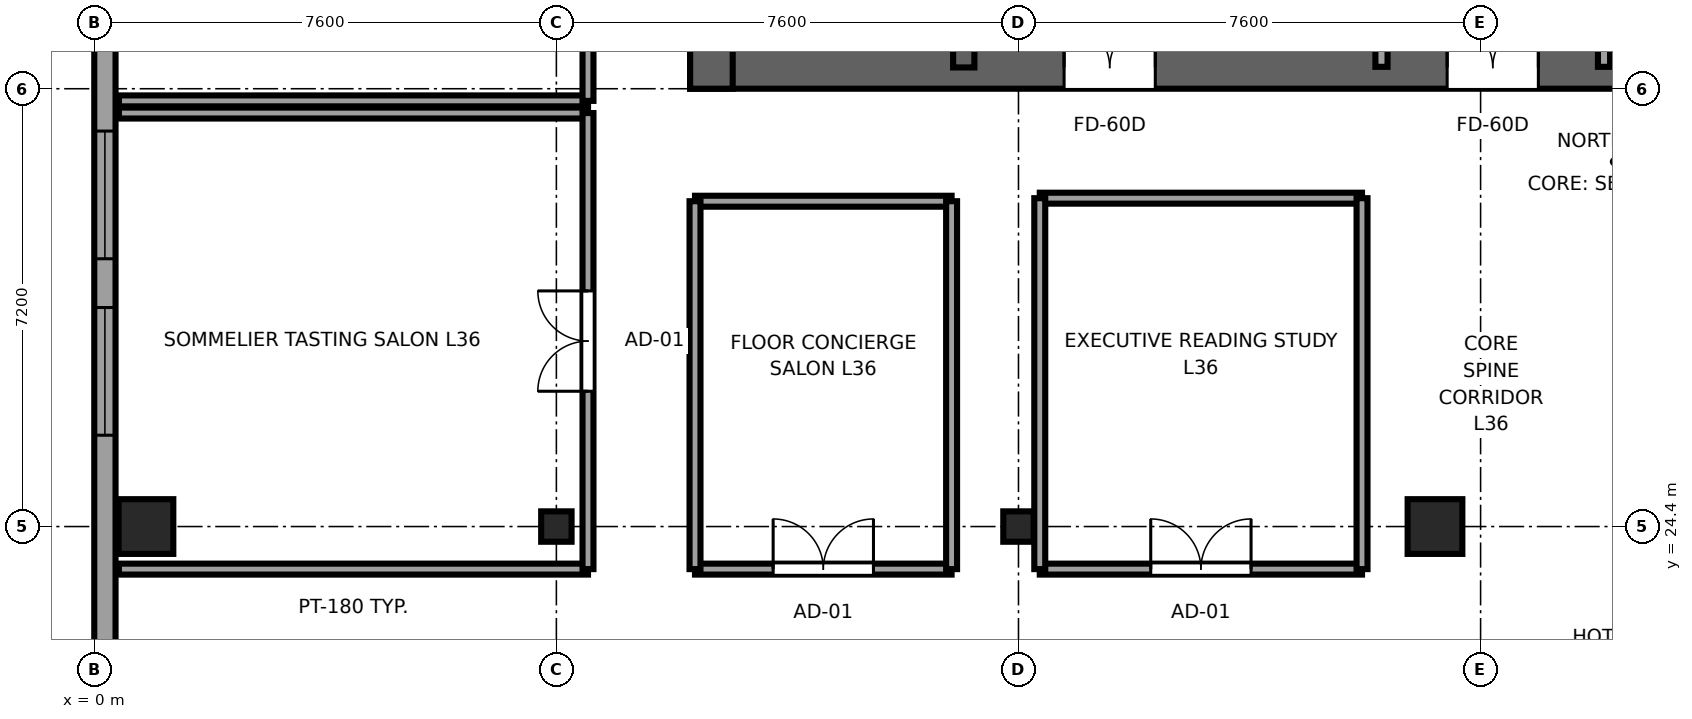
"""IFC4 building model, lengths in metres.
Left out: names, types, materials, properties, quantities, classifications, styles, units other than length and angle.
Written with IfcOpenShell. Run it as: python <this file> out.ifc"""

import sys

from ifc_helpers import new_model, si_unit, direction, frame, frame_2d, origin, origin_2d, place, context, subcontext, project, spatial, rectangle, i_section, extrude, source, transform, mapped, element, fill, save


model = new_model("IFC4")
c1 = context("Model", 3, precision=1e-05, world=origin(), true_north=direction((0.0, 1.0)))
c2 = subcontext(c1, "Body", "Model", "MODEL_VIEW")
j1 = project(units=[si_unit("LENGTHUNIT", "METRE"), si_unit("PLANEANGLEUNIT", "RADIAN")], contexts=[c1])
p1 = place(None, origin())
s1 = spatial("IfcSite", under=j1, at=p1, CompositionType="ELEMENT")
p2 = place(p1, origin())
s2 = spatial("IfcBuilding", under=s1, at=p2, CompositionType="ELEMENT")
p3 = place(p2, frame((0.0, 0.0, 139.95)))
s3 = spatial("IfcBuildingStorey", under=s2, at=p3, CompositionType="ELEMENT", Elevation=139.95)
p4 = place(p3, frame((9.8, 31.95, 0.0), z_axis=(0.0, 0.0, 1.0), x_axis=(1.0, 0.0, 0.0)))
e1 = element("IfcWall", 1, at=p4, inside=s3, PredefinedType="SHEAR", context=c2, shape_type="SweptSolid", body=[
    extrude(rectangle(XDim=26.4, YDim=0.7, at=frame_2d((13.2, 0.0))), origin(), (0.0, 0.0, 1.0), 3.55),
])
p5 = place(p4, frame((7.65, 0.0, 0.0), z_axis=(0.0, 0.0, 1.0), x_axis=(-1.0, 0.0, 0.0)))
e2 = element("IfcOpeningElement", 2, at=p5, cuts=e1, PredefinedType="OPENING", context=c2, shape_type="SweptSolid", body=[
    extrude(rectangle(XDim=1.5, YDim=2.04, at=frame_2d((0.75, 1.02))), frame((0.0, 0.36, 0.0), z_axis=(0.0, -1.0, 0.0), x_axis=(1.0, 0.0, 0.0)), (0.0, 0.0, 1.0), 0.72),
])
p6 = place(p4, frame((13.95, 0.0, 0.0), z_axis=(0.0, 0.0, 1.0), x_axis=(-1.0, 0.0, 0.0)))
e3 = element("IfcOpeningElement", 3, at=p6, cuts=e1, PredefinedType="OPENING", context=c2, shape_type="SweptSolid", body=[
    extrude(rectangle(XDim=1.5, YDim=2.04, at=frame_2d((0.75, 1.02))), frame((0.0, 0.36, 0.0), z_axis=(0.0, -1.0, 0.0), x_axis=(1.0, 0.0, 0.0)), (0.0, 0.0, 1.0), 0.72),
])
p7 = place(p4, frame((20.25, 0.0, 0.0), z_axis=(0.0, 0.0, 1.0), x_axis=(-1.0, 0.0, 0.0)))
e4 = element("IfcOpeningElement", 4, at=p7, cuts=e1, PredefinedType="OPENING", context=c2, shape_type="SweptSolid", body=[
    extrude(rectangle(XDim=1.5, YDim=2.04, at=frame_2d((0.75, 1.02))), frame((0.0, 0.36, 0.0), z_axis=(0.0, -1.0, 0.0), x_axis=(1.0, 0.0, 0.0)), (0.0, 0.0, 1.0), 0.72),
])
p8 = place(p3, frame((10.15, 31.6, 0.0), z_axis=(0.0, 0.0, 1.0), x_axis=(0.0, 1.0, 0.0)))
e5 = element("IfcWall", 5, at=p8, inside=s3, PredefinedType="SHEAR", context=c2, shape_type="SweptSolid", body=[
    extrude(rectangle(XDim=13.6, YDim=0.7, at=frame_2d((6.8, 0.0))), origin(), (0.0, 0.0, 1.0), 3.55),
])
p9 = place(p3, frame((14.3, 31.95, 0.0), z_axis=(0.0, 0.0, 1.0), x_axis=(0.0, 1.0, 0.0)))
e6 = element("IfcWall", 6, at=p9, inside=s3, PredefinedType="SHEAR", context=c2, shape_type="SweptSolid", body=[
    extrude(rectangle(XDim=12.9, YDim=0.35, at=frame_2d((6.45, 0.0))), origin(), (0.0, 0.0, 1.0), 3.55),
])
p10 = place(p9, frame((0.6, 0.0, 0.0)))
e7 = element("IfcOpeningElement", 7, at=p10, cuts=e6, PredefinedType="OPENING", context=c2, shape_type="SweptSolid", body=[
    extrude(rectangle(XDim=1.1, YDim=2.12, at=frame_2d((0.55, 1.06))), frame((0.0, 0.185, 0.0), z_axis=(0.0, -1.0, 0.0), x_axis=(1.0, 0.0, 0.0)), (0.0, 0.0, 1.0), 0.37),
])
m1 = source(origin(), c2, "Body", "SweptSolid", [
    extrude(rectangle(XDim=0.9, YDim=0.9, at=origin_2d()), origin(), (0.0, 0.0, 1.0), 3.55),
])
p11 = place(p3, frame((0.85, 24.4, 0.0), z_axis=(0.0, 0.0, 1.0), x_axis=(1.0, 0.0, 0.0)))
e8 = element("IfcColumn", 8, at=p11, inside=s3, PredefinedType="COLUMN", context=c2, shape_type="MappedRepresentation", body=[
    mapped(m1, transform((0.0, 0.0, 0.0), x_axis=(1.0, 0.0, 0.0), y_axis=(0.0, 1.0, 0.0), z_axis=(0.0, 0.0, 1.0), scale=1.0)),
])
m2 = source(origin(), c2, "Body", "SweptSolid", [
    extrude(i_section(OverallWidth=0.5, OverallDepth=0.5, WebThickness=0.022, FlangeThickness=0.034, at=origin_2d()), origin(), (0.0, 0.0, 1.0), 3.55),
])
for number, where, z_axis, x_axis in (
    (9, (7.6, 24.4, 0.0), (0.0, 0.0, 1.0), (1.0, 0.0, 0.0)),
    (10, (15.2, 24.4, 0.0), (0.0, 0.0, 1.0), (1.0, 0.0, 0.0)),
):
    element("IfcColumn", number, at=place(p3, frame(where, z_axis=z_axis, x_axis=x_axis)), inside=s3, PredefinedType="COLUMN", context=c2, shape_type="MappedRepresentation", body=[
        mapped(m2, transform((0.0, 0.0, 0.0), x_axis=(1.0, 0.0, 0.0), y_axis=(0.0, 1.0, 0.0), z_axis=(0.0, 0.0, 1.0), scale=1.0)),
    ])
p12 = place(p3, frame((22.05, 24.4, 0.0), z_axis=(0.0, 0.0, 1.0), x_axis=(1.0, 0.0, 0.0)))
e11 = element("IfcColumn", 11, at=p12, inside=s3, PredefinedType="COLUMN", context=c2, shape_type="MappedRepresentation", body=[
    mapped(m1, transform((0.0, 0.0, 0.0), x_axis=(1.0, 0.0, 0.0), y_axis=(0.0, 1.0, 0.0), z_axis=(0.0, 0.0, 1.0), scale=1.0)),
])
p13 = place(p3, frame((0.175, 41.383, 0.0), z_axis=(0.0, 0.0, 1.0), x_axis=(0.0, -1.0, 0.0)))
e12 = element("IfcWall", 12, at=p13, inside=s3, PredefinedType="SOLIDWALL", context=c2, shape_type="SweptSolid", body=[
    extrude(rectangle(XDim=36.766, YDim=0.35, at=frame_2d((18.383, 0.0))), origin(), (0.0, 0.0, 1.0), 3.37),
])
p14 = place(p13, frame((4.428, 0.0, 0.68)))
e13 = element("IfcOpeningElement", 13, at=p14, cuts=e12, PredefinedType="OPENING", context=c2, shape_type="SweptSolid", body=[
    extrude(rectangle(XDim=2.1, YDim=1.9, at=frame_2d((1.05, 0.95))), frame((0.0, 0.185, 0.0), z_axis=(0.0, -1.0, 0.0), x_axis=(1.0, 0.0, 0.0)), (0.0, 0.0, 1.0), 0.37),
])
p15 = place(p13, frame((10.479, 0.0, 0.68)))
e14 = element("IfcOpeningElement", 14, at=p15, cuts=e12, PredefinedType="OPENING", context=c2, shape_type="SweptSolid", body=[
    extrude(rectangle(XDim=2.1, YDim=1.9, at=frame_2d((1.05, 0.95))), frame((0.0, 0.185, 0.0), z_axis=(0.0, -1.0, 0.0), x_axis=(1.0, 0.0, 0.0)), (0.0, 0.0, 1.0), 0.37),
])
p16 = place(p13, frame((13.381, 0.0, 0.68)))
e15 = element("IfcOpeningElement", 15, at=p16, cuts=e12, PredefinedType="OPENING", context=c2, shape_type="SweptSolid", body=[
    extrude(rectangle(XDim=2.1, YDim=1.9, at=frame_2d((1.05, 0.95))), frame((0.0, 0.185, 0.0), z_axis=(0.0, -1.0, 0.0), x_axis=(1.0, 0.0, 0.0)), (0.0, 0.0, 1.0), 0.37),
])
p17 = place(p13, frame((21.285, 0.0, 0.68)))
e16 = element("IfcOpeningElement", 16, at=p17, cuts=e12, PredefinedType="OPENING", context=c2, shape_type="SweptSolid", body=[
    extrude(rectangle(XDim=2.1, YDim=1.9, at=frame_2d((1.05, 0.95))), frame((0.0, 0.185, 0.0), z_axis=(0.0, -1.0, 0.0), x_axis=(1.0, 0.0, 0.0)), (0.0, 0.0, 1.0), 0.37),
])
p18 = place(p13, frame((26.286, 0.0, 0.68)))
e17 = element("IfcOpeningElement", 17, at=p18, cuts=e12, PredefinedType="OPENING", context=c2, shape_type="SweptSolid", body=[
    extrude(rectangle(XDim=2.1, YDim=1.9, at=frame_2d((1.05, 0.95))), frame((0.0, 0.185, 0.0), z_axis=(0.0, -1.0, 0.0), x_axis=(1.0, 0.0, 0.0)), (0.0, 0.0, 1.0), 0.37),
])
p19 = place(p3, frame((21.17, 31.96, 0.0), z_axis=(0.0, 0.0, 1.0), x_axis=(0.0, 1.0, 0.0)))
e18 = element("IfcWall", 18, at=p19, inside=s3, PredefinedType="SOLIDWALL", context=c2, shape_type="SweptSolid", body=[
    extrude(rectangle(XDim=12.58, YDim=0.2, at=frame_2d((6.29, 0.0))), origin(), (0.0, 0.0, 1.0), 3.37),
])
p20 = place(p19, frame((5.74, 0.0, 0.0)))
e19 = element("IfcOpeningElement", 19, at=p20, cuts=e18, PredefinedType="OPENING", context=c2, shape_type="SweptSolid", body=[
    extrude(rectangle(XDim=1.1, YDim=2.12, at=frame_2d((0.55, 1.06))), frame((0.0, 0.11, 0.0), z_axis=(0.0, -1.0, 0.0), x_axis=(1.0, 0.0, 0.0)), (0.0, 0.0, 1.0), 0.22),
])
p21 = place(p19, frame((8.24, 0.0, 0.0)))
e20 = element("IfcOpeningElement", 20, at=p21, cuts=e18, PredefinedType="OPENING", context=c2, shape_type="SweptSolid", body=[
    extrude(rectangle(XDim=1.1, YDim=2.12, at=frame_2d((0.55, 1.06))), frame((0.0, 0.11, 0.0), z_axis=(0.0, -1.0, 0.0), x_axis=(1.0, 0.0, 0.0)), (0.0, 0.0, 1.0), 0.22),
])
p22 = place(p3, frame((24.83, 31.96, 0.0), z_axis=(0.0, 0.0, 1.0), x_axis=(0.0, 1.0, 0.0)))
e21 = element("IfcWall", 21, at=p22, inside=s3, PredefinedType="SOLIDWALL", context=c2, shape_type="SweptSolid", body=[
    extrude(rectangle(XDim=12.58, YDim=0.2, at=frame_2d((6.29, 0.0))), origin(), (0.0, 0.0, 1.0), 3.37),
])
p23 = place(p22, frame((5.74, 0.0, 0.0)))
e22 = element("IfcOpeningElement", 22, at=p23, cuts=e21, PredefinedType="OPENING", context=c2, shape_type="SweptSolid", body=[
    extrude(rectangle(XDim=1.1, YDim=2.12, at=frame_2d((0.55, 1.06))), frame((0.0, 0.11, 0.0), z_axis=(0.0, -1.0, 0.0), x_axis=(1.0, 0.0, 0.0)), (0.0, 0.0, 1.0), 0.22),
])
p24 = place(p22, frame((8.24, 0.0, 0.0)))
e23 = element("IfcOpeningElement", 23, at=p24, cuts=e21, PredefinedType="OPENING", context=c2, shape_type="SweptSolid", body=[
    extrude(rectangle(XDim=1.1, YDim=2.12, at=frame_2d((0.55, 1.06))), frame((0.0, 0.11, 0.0), z_axis=(0.0, -1.0, 0.0), x_axis=(1.0, 0.0, 0.0)), (0.0, 0.0, 1.0), 0.22),
])
for number, where, z_axis, x_axis in (
    (24, (0.405, 23.7, 0.0), (0.0, 0.0, 1.0), (1.0, 0.0, 0.0)),
    (25, (0.405, 31.2, 0.0), (0.0, 0.0, 1.0), (1.0, 0.0, 0.0)),
):
    element("IfcWall", number, at=place(p3, frame(where, z_axis=z_axis, x_axis=x_axis)), inside=s3, PredefinedType="PARTITIONING", context=c2, shape_type="SweptSolid", body=[
        extrude(rectangle(XDim=7.715, YDim=0.18, at=frame_2d((3.857, 0.0))), origin(), (0.0, 0.0, 1.0), 3.37),
    ])
p25 = place(p3, frame((8.12, 23.7, 0.0), z_axis=(0.0, 0.0, 1.0), x_axis=(0.0, 1.0, 0.0)))
e26 = element("IfcWall", 26, at=p25, inside=s3, PredefinedType="PARTITIONING", context=c2, shape_type="SweptSolid", body=[
    extrude(rectangle(XDim=7.5, YDim=0.18, at=frame_2d((3.75, 0.0))), origin(), (0.0, 0.0, 1.0), 3.37),
])
p26 = place(p25, frame((2.925, 0.0, 0.0)))
e27 = element("IfcOpeningElement", 27, at=p26, cuts=e26, PredefinedType="OPENING", context=c2, shape_type="SweptSolid", body=[
    extrude(rectangle(XDim=1.65, YDim=2.15, at=frame_2d((0.825, 1.075))), frame((0.0, 0.1, 0.0), z_axis=(0.0, -1.0, 0.0), x_axis=(1.0, 0.0, 0.0)), (0.0, 0.0, 1.0), 0.2),
])
p27 = place(p3, frame((0.405, 31.4, 0.0), z_axis=(0.0, 0.0, 1.0), x_axis=(1.0, 0.0, 0.0)))
e28 = element("IfcWall", 28, at=p27, inside=s3, PredefinedType="PARTITIONING", context=c2, shape_type="SweptSolid", body=[
    extrude(rectangle(XDim=7.715, YDim=0.18, at=frame_2d((3.857, 0.0))), origin(), (0.0, 0.0, 1.0), 3.37),
])
p28 = place(p3, frame((8.12, 31.4, 0.0), z_axis=(0.0, 0.0, 1.0), x_axis=(0.0, 1.0, 0.0)))
e29 = element("IfcWall", 29, at=p28, inside=s3, PredefinedType="PARTITIONING", context=c2, shape_type="SweptSolid", body=[
    extrude(rectangle(XDim=6.8, YDim=0.18, at=frame_2d((3.4, 0.0))), origin(), (0.0, 0.0, 1.0), 3.37),
])
p29 = place(p28, frame((3.175, 0.0, 0.0)))
e30 = element("IfcOpeningElement", 30, at=p29, cuts=e29, PredefinedType="OPENING", context=c2, shape_type="SweptSolid", body=[
    extrude(rectangle(XDim=1.65, YDim=2.15, at=frame_2d((0.825, 1.075))), frame((0.0, 0.1, 0.0), z_axis=(0.0, -1.0, 0.0), x_axis=(1.0, 0.0, 0.0)), (0.0, 0.0, 1.0), 0.2),
])
p30 = place(p3, frame((9.88, 23.7, 0.0), z_axis=(0.0, 0.0, 1.0), x_axis=(1.0, 0.0, 0.0)))
e31 = element("IfcWall", 31, at=p30, inside=s3, PredefinedType="PARTITIONING", context=c2, shape_type="SweptSolid", body=[
    extrude(rectangle(XDim=4.22, YDim=0.18, at=frame_2d((2.11, 0.0))), origin(), (0.0, 0.0, 1.0), 3.37),
])
p31 = place(p30, frame((1.285, 0.0, 0.0)))
e32 = element("IfcOpeningElement", 32, at=p31, cuts=e31, PredefinedType="OPENING", context=c2, shape_type="SweptSolid", body=[
    extrude(rectangle(XDim=1.65, YDim=2.15, at=frame_2d((0.825, 1.075))), frame((0.0, 0.1, 0.0), z_axis=(0.0, -1.0, 0.0), x_axis=(1.0, 0.0, 0.0)), (0.0, 0.0, 1.0), 0.2),
])
p32 = place(p3, frame((9.88, 29.75, 0.0), z_axis=(0.0, 0.0, 1.0), x_axis=(1.0, 0.0, 0.0)))
e33 = element("IfcWall", 33, at=p32, inside=s3, PredefinedType="PARTITIONING", context=c2, shape_type="SweptSolid", body=[
    extrude(rectangle(XDim=4.22, YDim=0.18, at=frame_2d((2.11, 0.0))), origin(), (0.0, 0.0, 1.0), 3.37),
])
for number, where, z_axis, x_axis in (
    (34, (9.88, 23.7, 0.0), (0.0, 0.0, 1.0), (0.0, 1.0, 0.0)),
    (35, (14.1, 23.7, 0.0), (0.0, 0.0, 1.0), (0.0, 1.0, 0.0)),
):
    element("IfcWall", number, at=place(p3, frame(where, z_axis=z_axis, x_axis=x_axis)), inside=s3, PredefinedType="PARTITIONING", context=c2, shape_type="SweptSolid", body=[
        extrude(rectangle(XDim=6.05, YDim=0.18, at=frame_2d((3.025, 0.0))), origin(), (0.0, 0.0, 1.0), 3.37),
    ])
p33 = place(p3, frame((15.55, 23.7, 0.0), z_axis=(0.0, 0.0, 1.0), x_axis=(1.0, 0.0, 0.0)))
e36 = element("IfcWall", 36, at=p33, inside=s3, PredefinedType="PARTITIONING", context=c2, shape_type="SweptSolid", body=[
    extrude(rectangle(XDim=5.3, YDim=0.18, at=frame_2d((2.65, 0.0))), origin(), (0.0, 0.0, 1.0), 3.37),
])
p34 = place(p33, frame((1.825, 0.0, 0.0)))
e37 = element("IfcOpeningElement", 37, at=p34, cuts=e36, PredefinedType="OPENING", context=c2, shape_type="SweptSolid", body=[
    extrude(rectangle(XDim=1.65, YDim=2.15, at=frame_2d((0.825, 1.075))), frame((0.0, 0.1, 0.0), z_axis=(0.0, -1.0, 0.0), x_axis=(1.0, 0.0, 0.0)), (0.0, 0.0, 1.0), 0.2),
])
p35 = place(p3, frame((15.55, 29.8, 0.0), z_axis=(0.0, 0.0, 1.0), x_axis=(1.0, 0.0, 0.0)))
e38 = element("IfcWall", 38, at=p35, inside=s3, PredefinedType="PARTITIONING", context=c2, shape_type="SweptSolid", body=[
    extrude(rectangle(XDim=5.3, YDim=0.18, at=frame_2d((2.65, 0.0))), origin(), (0.0, 0.0, 1.0), 3.37),
])
for number, where, z_axis, x_axis in (
    (39, (15.55, 23.7, 0.0), (0.0, 0.0, 1.0), (0.0, 1.0, 0.0)),
    (40, (20.85, 23.7, 0.0), (0.0, 0.0, 1.0), (0.0, 1.0, 0.0)),
):
    element("IfcWall", number, at=place(p3, frame(where, z_axis=z_axis, x_axis=x_axis)), inside=s3, PredefinedType="PARTITIONING", context=c2, shape_type="SweptSolid", body=[
        extrude(rectangle(XDim=6.1, YDim=0.18, at=frame_2d((3.05, 0.0))), origin(), (0.0, 0.0, 1.0), 3.37),
    ])
m3 = source(origin(), c2, "Body", "SweptSolid", [
    extrude(rectangle(XDim=2.1, YDim=1.9, at=frame_2d((1.05, 0.95))), frame((0.0, 0.09, 0.0), z_axis=(0.0, -1.0, 0.0), x_axis=(1.0, 0.0, 0.0)), (0.0, 0.0, 1.0), 0.06),
])
p36 = place(p15, origin())
e41 = element("IfcWindow", 41, at=p36, inside=s3, PartitioningType="TRIPLE_PANEL_HORIZONTAL", PredefinedType="WINDOW", context=c2, shape_type="MappedRepresentation", body=[
    mapped(m3, transform((0.0, 0.0, 0.0), x_axis=(1.0, 0.0, 0.0), y_axis=(0.0, 1.0, 0.0), z_axis=(0.0, 0.0, 1.0), scale=1.0)),
])
fill(e14, e41)
p37 = place(p16, origin())
e42 = element("IfcWindow", 42, at=p37, inside=s3, PartitioningType="TRIPLE_PANEL_HORIZONTAL", PredefinedType="WINDOW", context=c2, shape_type="MappedRepresentation", body=[
    mapped(m3, transform((0.0, 0.0, 0.0), x_axis=(1.0, 0.0, 0.0), y_axis=(0.0, 1.0, 0.0), z_axis=(0.0, 0.0, 1.0), scale=1.0)),
])
fill(e15, e42)
m4 = source(origin(), c2, "Body", "SweptSolid", [
    extrude(rectangle(XDim=1.5, YDim=2.04, at=frame_2d((0.75, 1.02))), frame((0.0, 0.025, 0.0), z_axis=(0.0, -1.0, 0.0), x_axis=(1.0, 0.0, 0.0)), (0.0, 0.0, 1.0), 0.05),
])
p38 = place(p5, origin())
e43 = element("IfcDoor", 43, at=p38, inside=s3, OperationType="DOUBLE_DOOR_SINGLE_SWING", PredefinedType="DOOR", context=c2, shape_type="MappedRepresentation", body=[
    mapped(m4, transform((0.0, 0.0, 0.0), x_axis=(1.0, 0.0, 0.0), y_axis=(0.0, 1.0, 0.0), z_axis=(0.0, 0.0, 1.0), scale=1.0)),
])
fill(e2, e43)
p39 = place(p6, origin())
e44 = element("IfcDoor", 44, at=p39, inside=s3, OperationType="DOUBLE_DOOR_SINGLE_SWING", PredefinedType="DOOR", context=c2, shape_type="MappedRepresentation", body=[
    mapped(m4, transform((0.0, 0.0, 0.0), x_axis=(1.0, 0.0, 0.0), y_axis=(0.0, 1.0, 0.0), z_axis=(0.0, 0.0, 1.0), scale=1.0)),
])
fill(e3, e44)
m5 = source(origin(), c2, "Body", "SweptSolid", [
    extrude(rectangle(XDim=1.65, YDim=2.15, at=frame_2d((0.825, 1.075))), frame((0.0, 0.025, 0.0), z_axis=(0.0, -1.0, 0.0), x_axis=(1.0, 0.0, 0.0)), (0.0, 0.0, 1.0), 0.05),
])
p40 = place(p26, origin())
e45 = element("IfcDoor", 45, at=p40, inside=s3, OperationType="DOUBLE_DOOR_SINGLE_SWING", PredefinedType="DOOR", context=c2, shape_type="MappedRepresentation", body=[
    mapped(m5, transform((0.0, 0.0, 0.0), x_axis=(1.0, 0.0, 0.0), y_axis=(0.0, 1.0, 0.0), z_axis=(0.0, 0.0, 1.0), scale=1.0)),
])
fill(e27, e45)
p41 = place(p31, origin())
e46 = element("IfcDoor", 46, at=p41, inside=s3, OperationType="DOUBLE_DOOR_SINGLE_SWING", PredefinedType="DOOR", context=c2, shape_type="MappedRepresentation", body=[
    mapped(m5, transform((0.0, 0.0, 0.0), x_axis=(1.0, 0.0, 0.0), y_axis=(0.0, 1.0, 0.0), z_axis=(0.0, 0.0, 1.0), scale=1.0)),
])
fill(e32, e46)
p42 = place(p34, origin())
e47 = element("IfcDoor", 47, at=p42, inside=s3, OperationType="DOUBLE_DOOR_SINGLE_SWING", PredefinedType="DOOR", context=c2, shape_type="MappedRepresentation", body=[
    mapped(m5, transform((0.0, 0.0, 0.0), x_axis=(1.0, 0.0, 0.0), y_axis=(0.0, 1.0, 0.0), z_axis=(0.0, 0.0, 1.0), scale=1.0)),
])
fill(e37, e47)
save(model, sys.argv[1])
